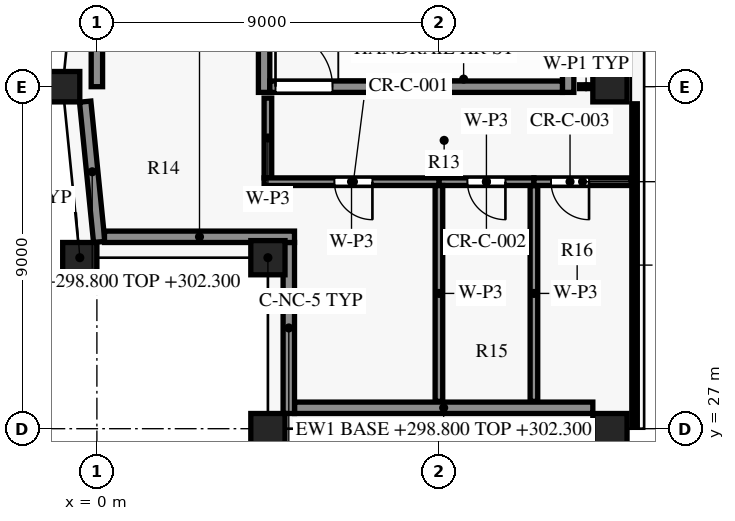
"""IFC4 building model, lengths in metres.
Left out: names, types, materials, properties, quantities, classifications, styles, units other than length and angle.
Written with IfcOpenShell. Run it as: python <this file> out.ifc"""

import sys

from ifc_helpers import new_model, si_unit, direction, frame, frame_2d, origin, origin_2d, place, context, subcontext, project, spatial, rectangle, extrude, element, fill, save


model = new_model("IFC4")
c1 = context("Model", 3, precision=1e-05, world=origin(), true_north=direction((0.0, 1.0)))
c2 = subcontext(c1, "Body", "Model", "MODEL_VIEW")
j1 = project(units=[si_unit("LENGTHUNIT", "METRE"), si_unit("PLANEANGLEUNIT", "RADIAN")], contexts=[c1])
p1 = place(None, origin())
s1 = spatial("IfcSite", under=j1, at=p1, CompositionType="ELEMENT")
p2 = place(p1, origin())
s2 = spatial("IfcBuilding", under=s1, at=p2, CompositionType="ELEMENT")
p3 = place(p2, frame((0.0, 0.0, 298.8)))
s3 = spatial("IfcBuildingStorey", under=s2, at=p3, CompositionType="ELEMENT", Elevation=298.8)
for number, where, z_axis, x_axis in (
    (1, (4.5, 27.0, 0.0), (0.0, 0.0, 1.0), (1.0, 0.0, 0.0)),
    (2, (13.5, 27.0, 0.0), (0.0, 0.0, 1.0), (1.0, 0.0, 0.0)),
    (3, (13.5, 36.0, 0.0), (0.0, 0.0, 1.0), (1.0, 0.0, 0.0)),
    (4, (-0.9, 36.0, 0.0), (0.0, 0.0, 1.0), (0.0, -1.0, 0.0)),
    (5, (-0.45, 31.5, 0.0), (0.0, 0.0, 1.0), (0.1, -0.995, 0.0)),
):
    element("IfcColumn", number, at=place(p3, frame(where, z_axis=z_axis, x_axis=x_axis)), inside=s3, PredefinedType="COLUMN", context=c2, shape_type="SweptSolid", body=[
        extrude(rectangle(XDim=0.9, YDim=0.8, at=origin_2d()), origin(), (0.0, 0.0, 1.0), 4.0),
    ])
p4 = place(p3, frame((4.5, 31.5, 0.0), z_axis=(0.0, 0.0, 1.0), x_axis=(1.0, 0.0, 0.0)))
e6 = element("IfcColumn", 6, at=p4, inside=s3, PredefinedType="COLUMN", context=c2, shape_type="SweptSolid", body=[
    extrude(rectangle(XDim=0.9, YDim=0.9, at=origin_2d()), origin(), (0.0, 0.0, 1.0), 4.0),
])
p5 = place(p3, frame((13.05, 27.55, 0.0), z_axis=(0.0, 0.0, 1.0), x_axis=(-1.0, 0.0, 0.0)))
e7 = element("IfcWall", 7, at=p5, inside=s3, PredefinedType="SOLIDWALL", context=c2, shape_type="SweptSolid", body=[
    extrude(rectangle(XDim=7.85, YDim=0.3, at=frame_2d((3.925, 0.0))), origin(), (0.0, 0.0, 1.0), 3.5),
])
p6 = place(p3, frame((0.061, 31.915, 0.0), z_axis=(0.0, 0.0, 1.0), x_axis=(-0.099549320092, 0.995032629048, 0.0)))
e8 = element("IfcWall", 8, at=p6, inside=s3, PredefinedType="SOLIDWALL", context=c2, shape_type="SweptSolid", body=[
    extrude(rectangle(XDim=3.71, YDim=0.3, at=frame_2d((1.855, 0.0))), origin(), (0.0, 0.0, 1.0), 3.5),
])
p7 = place(p3, frame((5.2, 32.05, 0.0), z_axis=(0.0, 0.0, 1.0), x_axis=(-1.0, 0.0, 0.0)))
e9 = element("IfcWall", 9, at=p7, inside=s3, PredefinedType="SOLIDWALL", context=c2, shape_type="SweptSolid", body=[
    extrude(rectangle(XDim=5.0, YDim=0.3, at=frame_2d((2.5, 0.0))), origin(), (0.0, 0.0, 1.0), 3.5),
])
p8 = place(p3, frame((5.05, 27.4, 0.0), z_axis=(0.0, 0.0, 1.0), x_axis=(0.0, 1.0, 0.0)))
e10 = element("IfcWall", 10, at=p8, inside=s3, PredefinedType="SOLIDWALL", context=c2, shape_type="SweptSolid", body=[
    extrude(rectangle(XDim=4.502, YDim=0.3, at=frame_2d((2.251, 0.0))), origin(), (0.0, 0.0, 1.0), 3.5),
])
p9 = place(p3, frame((4.55, 36.0, 0.0), z_axis=(0.0, 0.0, 1.0), x_axis=(1.0, 0.0, 0.0)))
e11 = element("IfcWall", 11, at=p9, inside=s3, PredefinedType="SHEAR", context=c2, shape_type="SweptSolid", body=[
    extrude(rectangle(XDim=7.7, YDim=0.3, at=frame_2d((3.85, 0.0))), origin(), (0.0, 0.0, 1.0), 3.7),
])
p10 = place(p9, frame((0.15, 0.0, 0.0)))
e12 = element("IfcOpeningElement", 12, at=p10, cuts=e11, PredefinedType="OPENING", context=c2, shape_type="SweptSolid", body=[
    extrude(rectangle(XDim=1.5, YDim=2.2, at=frame_2d((0.75, 1.1))), frame((0.0, 0.16, 0.0), z_axis=(0.0, -1.0, 0.0), x_axis=(1.0, 0.0, 0.0)), (0.0, 0.0, 1.0), 0.32),
])
p11 = place(p3, frame((0.0, 36.0, 0.0), z_axis=(0.0, 0.0, 1.0), x_axis=(0.0, 1.0, 0.0)))
e13 = element("IfcWall", 13, at=p11, inside=s3, PredefinedType="SHEAR", context=c2, shape_type="SweptSolid", body=[
    extrude(rectangle(XDim=7.275, YDim=0.3, at=frame_2d((3.637, 0.0))), origin(), (0.0, 0.0, 1.0), 3.7),
])
p12 = place(p3, frame((4.4, 35.85, 0.0), z_axis=(0.0, 0.0, 1.0), x_axis=(0.0, 1.0, 0.0)))
e14 = element("IfcWall", 14, at=p12, inside=s3, PredefinedType="SHEAR", context=c2, shape_type="SweptSolid", body=[
    extrude(rectangle(XDim=3.75, YDim=0.3, at=frame_2d((1.875, 0.0))), origin(), (0.0, 0.0, 1.0), 3.7),
])
p13 = place(p3, frame((12.4, 35.85, 0.0), z_axis=(0.0, 0.0, 1.0), x_axis=(0.0, 1.0, 0.0)))
e15 = element("IfcWall", 15, at=p13, inside=s3, PredefinedType="SHEAR", context=c2, shape_type="SweptSolid", body=[
    extrude(rectangle(XDim=3.9, YDim=0.3, at=frame_2d((1.95, 0.0))), origin(), (0.0, 0.0, 1.0), 3.7),
])
for number, where, z_axis, x_axis in (
    (16, (9.0, 33.4, 0.0), (0.0, 0.0, 1.0), (0.0, -1.0, 0.0)),
    (17, (11.5, 33.4, 0.0), (0.0, 0.0, 1.0), (0.0, -1.0, 0.0)),
):
    element("IfcWall", number, at=place(p3, frame(where, z_axis=z_axis, x_axis=x_axis)), inside=s3, PredefinedType="PARTITIONING", context=c2, shape_type="SweptSolid", body=[
        extrude(rectangle(XDim=5.68, YDim=0.2, at=frame_2d((2.84, 0.0))), origin(), (0.0, 0.0, 1.0), 3.68),
    ])
p14 = place(p3, frame((9.0, 33.5, 0.0), z_axis=(0.0, 0.0, 1.0), x_axis=(-1.0, 0.0, 0.0)))
e18 = element("IfcWall", 18, at=p14, inside=s3, PredefinedType="PARTITIONING", context=c2, shape_type="SweptSolid", body=[
    extrude(rectangle(XDim=4.6, YDim=0.2, at=frame_2d((2.3, 0.0))), origin(), (0.0, 0.0, 1.0), 3.68),
])
p15 = place(p14, frame((1.75, 0.0, 0.0)))
e19 = element("IfcOpeningElement", 19, at=p15, cuts=e18, PredefinedType="OPENING", context=c2, shape_type="SweptSolid", body=[
    extrude(rectangle(XDim=1.0, YDim=2.1, at=frame_2d((0.5, 1.05))), frame((0.0, 0.11, 0.0), z_axis=(0.0, -1.0, 0.0), x_axis=(1.0, 0.0, 0.0)), (0.0, 0.0, 1.0), 0.22),
])
p16 = place(p3, frame((11.5, 33.5, 0.0), z_axis=(0.0, 0.0, 1.0), x_axis=(-1.0, 0.0, 0.0)))
e20 = element("IfcWall", 20, at=p16, inside=s3, PredefinedType="PARTITIONING", context=c2, shape_type="SweptSolid", body=[
    extrude(rectangle(XDim=2.5, YDim=0.2, at=frame_2d((1.25, 0.0))), origin(), (0.0, 0.0, 1.0), 3.68),
])
p17 = place(p16, frame((0.75, 0.0, 0.0)))
e21 = element("IfcOpeningElement", 21, at=p17, cuts=e20, PredefinedType="OPENING", context=c2, shape_type="SweptSolid", body=[
    extrude(rectangle(XDim=1.0, YDim=2.1, at=frame_2d((0.5, 1.05))), frame((0.0, 0.11, 0.0), z_axis=(0.0, -1.0, 0.0), x_axis=(1.0, 0.0, 0.0)), (0.0, 0.0, 1.0), 0.22),
])
p18 = place(p3, frame((14.06, 33.5, 0.0), z_axis=(0.0, 0.0, 1.0), x_axis=(-1.0, 0.0, 0.0)))
e22 = element("IfcWall", 22, at=p18, inside=s3, PredefinedType="PARTITIONING", context=c2, shape_type="SweptSolid", body=[
    extrude(rectangle(XDim=2.56, YDim=0.2, at=frame_2d((1.28, 0.0))), origin(), (0.0, 0.0, 1.0), 3.33),
])
p19 = place(p18, frame((1.11, 0.0, 0.0)))
e23 = element("IfcOpeningElement", 23, at=p19, cuts=e22, PredefinedType="OPENING", context=c2, shape_type="SweptSolid", body=[
    extrude(rectangle(XDim=1.0, YDim=2.1, at=frame_2d((0.5, 1.05))), frame((0.0, 0.11, 0.0), z_axis=(0.0, -1.0, 0.0), x_axis=(1.0, 0.0, 0.0)), (0.0, 0.0, 1.0), 0.22),
])
p20 = place(p3, frame((4.5, 33.6, 0.0), z_axis=(0.0, 0.0, 1.0), x_axis=(0.0, 1.0, 0.0)))
e24 = element("IfcWall", 24, at=p20, inside=s3, PredefinedType="PARTITIONING", context=c2, shape_type="SweptSolid", body=[
    extrude(rectangle(XDim=2.1, YDim=0.2, at=frame_2d((1.05, 0.0))), origin(), (0.0, 0.0, 1.0), 3.68),
])
p21 = place(p3, frame((12.7, 36.0, 0.0), z_axis=(0.0, 0.0, 1.0), x_axis=(1.0, 0.0, 0.0)))
e25 = element("IfcWall", 25, at=p21, inside=s3, PredefinedType="PARTITIONING", context=c2, shape_type="SweptSolid", body=[
    extrude(rectangle(XDim=0.345, YDim=0.1, at=frame_2d((0.172, 0.0))), origin(), (0.0, 0.0, 1.0), 3.68),
])
p22 = place(p10, origin())
e26 = element("IfcDoor", 26, at=p22, inside=s3, OperationType="SINGLE_SWING_RIGHT", PredefinedType="DOOR", context=c2, shape_type="SweptSolid", body=[
    extrude(rectangle(XDim=1.5, YDim=2.2, at=frame_2d((0.75, 1.1))), frame((0.0, 0.025, 0.0), z_axis=(0.0, -1.0, 0.0), x_axis=(1.0, 0.0, 0.0)), (0.0, 0.0, 1.0), 0.05),
])
fill(e12, e26)
p23 = place(p15, origin())
e27 = element("IfcDoor", 27, at=p23, inside=s3, OperationType="SINGLE_SWING_RIGHT", PredefinedType="DOOR", context=c2, shape_type="SweptSolid", body=[
    extrude(rectangle(XDim=1.0, YDim=2.1, at=frame_2d((0.5, 1.05))), frame((0.0, 0.025, 0.0), z_axis=(0.0, -1.0, 0.0), x_axis=(1.0, 0.0, 0.0)), (0.0, 0.0, 1.0), 0.05),
])
fill(e19, e27)
p24 = place(p17, origin())
e28 = element("IfcDoor", 28, at=p24, inside=s3, OperationType="SINGLE_SWING_RIGHT", PredefinedType="DOOR", context=c2, shape_type="SweptSolid", body=[
    extrude(rectangle(XDim=1.0, YDim=2.1, at=frame_2d((0.5, 1.05))), frame((0.0, 0.025, 0.0), z_axis=(0.0, -1.0, 0.0), x_axis=(1.0, 0.0, 0.0)), (0.0, 0.0, 1.0), 0.05),
])
fill(e21, e28)
p25 = place(p19, origin())
e29 = element("IfcDoor", 29, at=p25, inside=s3, OperationType="SINGLE_SWING_LEFT", PredefinedType="DOOR", context=c2, shape_type="SweptSolid", body=[
    extrude(rectangle(XDim=1.0, YDim=2.1, at=frame_2d((0.5, 1.05))), frame((0.0, 0.025, 0.0), z_axis=(0.0, -1.0, 0.0), x_axis=(1.0, 0.0, 0.0)), (0.0, 0.0, 1.0), 0.05),
])
fill(e23, e29)
save(model, sys.argv[1])
